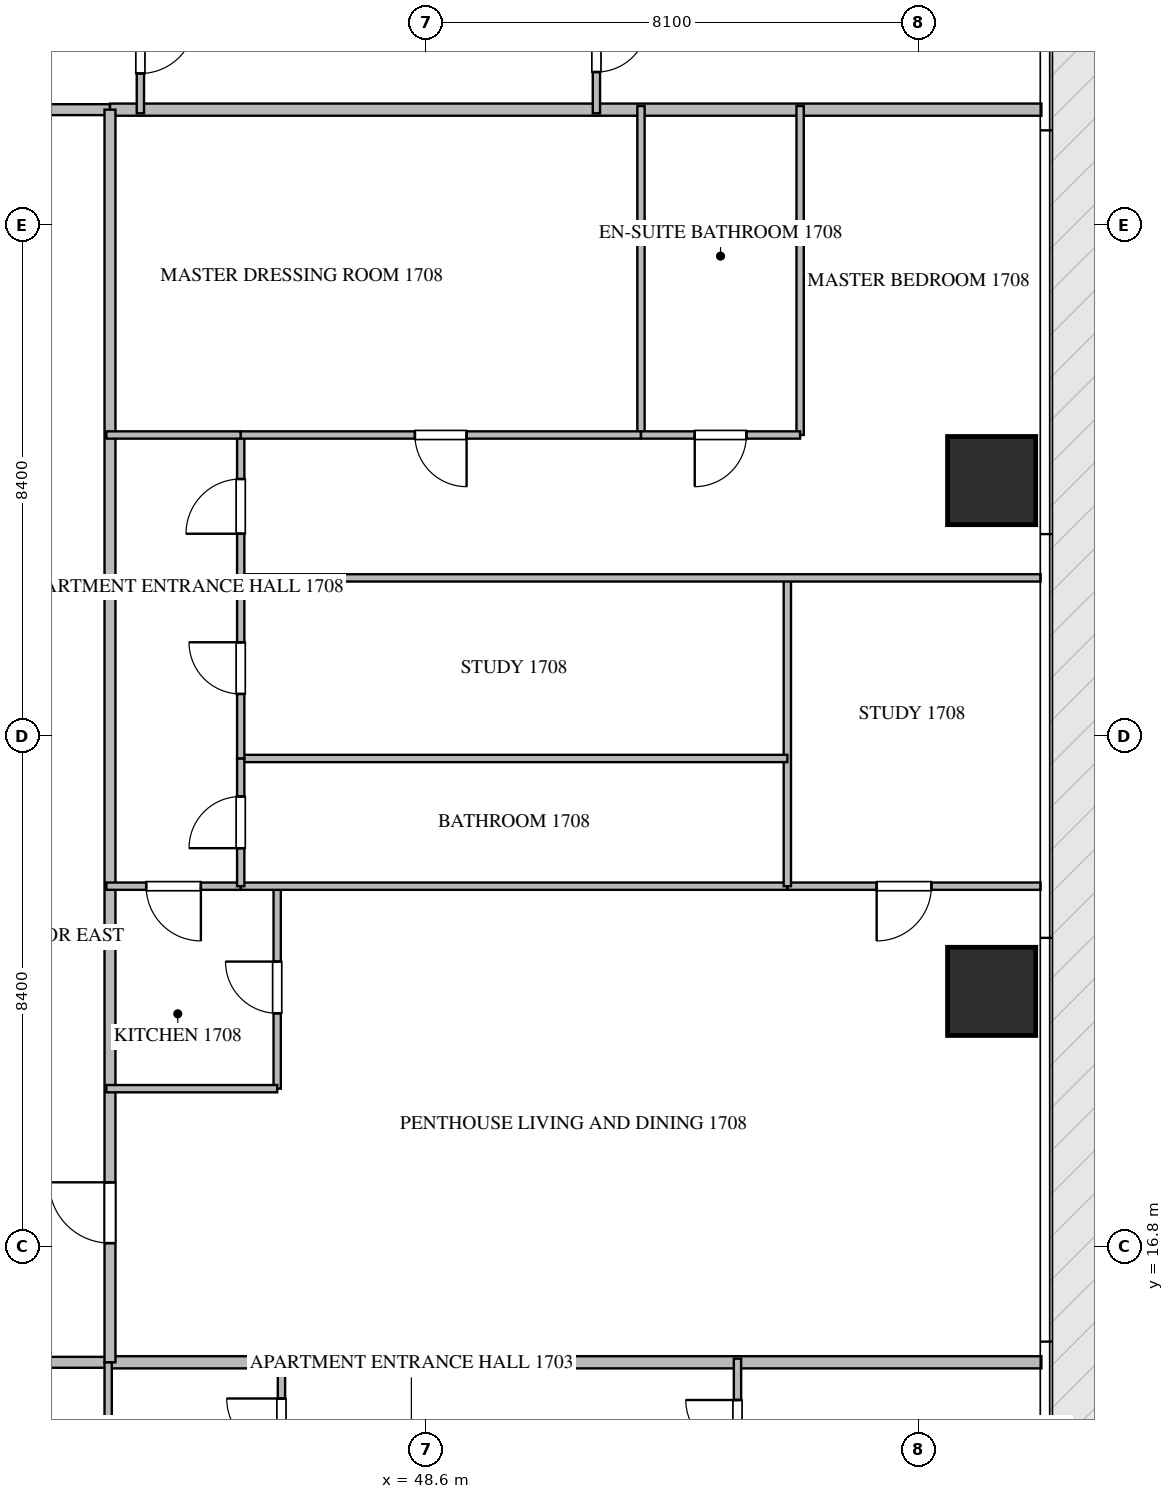
"""IFC4 building model, lengths in metres.
Left out: names, types, materials, properties, quantities, classifications, styles, units other than length and angle.
Written with IfcOpenShell. Run it as: python <this file> out.ifc"""

import sys

from ifc_helpers import new_model, si_unit, direction, frame, frame_2d, origin, origin_2d, place, context, subcontext, project, spatial, rectangle, extrude, source, transform, mapped, element, fill, save


model = new_model("IFC4")
c1 = context("Model", 3, precision=1e-05, world=origin(), true_north=direction((0.0, 1.0)))
c2 = subcontext(c1, "Body", "Model", "MODEL_VIEW")
j1 = project(units=[si_unit("LENGTHUNIT", "METRE"), si_unit("PLANEANGLEUNIT", "RADIAN")], contexts=[c1])
p1 = place(None, origin())
s1 = spatial("IfcSite", under=j1, at=p1, CompositionType="ELEMENT")
p2 = place(p1, origin())
s2 = spatial("IfcBuilding", under=s1, at=p2, CompositionType="ELEMENT")
p3 = place(p2, frame((0.0, 0.0, 71.7)))
s3 = spatial("IfcBuildingStorey", under=s2, at=p3, CompositionType="ELEMENT", Elevation=71.7)
m1 = source(origin(), c2, "Body", "SweptSolid", [
    extrude(rectangle(XDim=1.45, YDim=1.45, at=origin_2d()), origin(), (0.0, 0.0, 1.0), 3.75),
])
for number, where, z_axis, x_axis in (
    (1, (57.9, 21.0, -0.26), (0.0, 0.0, 1.0), (1.0, 0.0, 0.0)),
    (2, (57.9, 29.4, -0.26), (0.0, 0.0, 1.0), (1.0, 0.0, 0.0)),
):
    element("IfcColumn", number, at=place(p3, frame(where, z_axis=z_axis, x_axis=x_axis)), inside=s3, PredefinedType="COLUMN", context=c2, shape_type="MappedRepresentation", body=[
        mapped(m1, transform((0.0, 0.0, 0.0), scale=1.0)),
    ])
for number, where, z_axis, x_axis in (
    (3, (43.4, 14.9, 0.0), (0.0, 0.0, 1.0), (1.0, 0.0, 0.0)),
    (4, (43.4, 35.5, 0.0), (0.0, 0.0, 1.0), (1.0, 0.0, 0.0)),
):
    element("IfcWall", number, at=place(p3, frame(where, z_axis=z_axis, x_axis=x_axis)), inside=s3, PredefinedType="PARTITIONING", context=c2, shape_type="SweptSolid", body=[
        extrude(rectangle(XDim=15.318, YDim=0.2, at=frame_2d((7.659, 0.0))), origin(), (0.0, 0.0, 1.0), 3.49),
    ])
p4 = place(p3, frame((21.402, 14.9, 0.0), z_axis=(0.0, 0.0, 1.0), x_axis=(1.0, 0.0, 0.0)))
e5 = element("IfcWall", 5, at=p4, inside=s3, PredefinedType="PARTITIONING", context=c2, shape_type="SweptSolid", body=[
    extrude(rectangle(XDim=21.996, YDim=0.18, at=frame_2d((10.998, 0.0))), origin(), (0.0, 0.0, 1.0), 3.49),
])
p5 = place(p4, frame((2.1, 0.0, 0.0)))
e6 = element("IfcOpeningElement", 6, at=p5, cuts=e5, PredefinedType="OPENING", context=c2, shape_type="SweptSolid", body=[
    extrude(rectangle(XDim=1.0, YDim=2.15, at=frame_2d((0.5, 1.075))), frame((0.0, 0.1, 0.0), z_axis=(0.0, -1.0, 0.0), x_axis=(1.0, 0.0, 0.0)), (0.0, 0.0, 1.0), 0.2),
])
p6 = place(p4, frame((6.173, 0.0, 0.0)))
e7 = element("IfcOpeningElement", 7, at=p6, cuts=e5, PredefinedType="OPENING", context=c2, shape_type="SweptSolid", body=[
    extrude(rectangle(XDim=1.0, YDim=2.15, at=frame_2d((0.5, 1.075))), frame((0.0, 0.1, 0.0), z_axis=(0.0, -1.0, 0.0), x_axis=(1.0, 0.0, 0.0)), (0.0, 0.0, 1.0), 0.2),
])
p7 = place(p4, frame((18.896, 0.0, 0.0)))
e8 = element("IfcOpeningElement", 8, at=p7, cuts=e5, PredefinedType="OPENING", context=c2, shape_type="SweptSolid", body=[
    extrude(rectangle(XDim=1.0, YDim=2.15, at=frame_2d((0.5, 1.075))), frame((0.0, 0.1, 0.0), z_axis=(0.0, -1.0, 0.0), x_axis=(1.0, 0.0, 0.0)), (0.0, 0.0, 1.0), 0.2),
])
p8 = place(p3, frame((21.402, 35.5, 0.0), z_axis=(0.0, 0.0, 1.0), x_axis=(1.0, 0.0, 0.0)))
e9 = element("IfcWall", 9, at=p8, inside=s3, PredefinedType="PARTITIONING", context=c2, shape_type="SweptSolid", body=[
    extrude(rectangle(XDim=21.996, YDim=0.18, at=frame_2d((10.998, 0.0))), origin(), (0.0, 0.0, 1.0), 3.49),
])
p9 = place(p8, frame((5.774, 0.0, 0.0)))
e10 = element("IfcOpeningElement", 10, at=p9, cuts=e9, PredefinedType="OPENING", context=c2, shape_type="SweptSolid", body=[
    extrude(rectangle(XDim=1.0, YDim=2.15, at=frame_2d((0.5, 1.075))), frame((0.0, 0.1, 0.0), z_axis=(0.0, -1.0, 0.0), x_axis=(1.0, 0.0, 0.0)), (0.0, 0.0, 1.0), 0.2),
])
p10 = place(p8, frame((16.272, 0.0, 0.0)))
e11 = element("IfcOpeningElement", 11, at=p10, cuts=e9, PredefinedType="OPENING", context=c2, shape_type="SweptSolid", body=[
    extrude(rectangle(XDim=1.0, YDim=2.15, at=frame_2d((0.5, 1.075))), frame((0.0, 0.1, 0.0), z_axis=(0.0, -1.0, 0.0), x_axis=(1.0, 0.0, 0.0)), (0.0, 0.0, 1.0), 0.2),
])
p11 = place(p3, frame((43.4, 14.9, 0.0), z_axis=(0.0, 0.0, 1.0), x_axis=(0.0, 1.0, 0.0)))
e12 = element("IfcWall", 12, at=p11, inside=s3, PredefinedType="PARTITIONING", context=c2, shape_type="SweptSolid", body=[
    extrude(rectangle(XDim=20.6, YDim=0.18, at=frame_2d((10.3, 0.0))), origin(), (0.0, 0.0, 1.0), 3.49),
])
p12 = place(p11, frame((1.96, 0.0, 0.0)))
e13 = element("IfcOpeningElement", 13, at=p12, cuts=e12, PredefinedType="OPENING", context=c2, shape_type="SweptSolid", body=[
    extrude(rectangle(XDim=1.0, YDim=2.15, at=frame_2d((0.5, 1.075))), frame((0.0, 0.1, 0.0), z_axis=(0.0, -1.0, 0.0), x_axis=(1.0, 0.0, 0.0)), (0.0, 0.0, 1.0), 0.2),
])
p13 = place(p3, frame((43.37, 12.15, 0.0), z_axis=(0.0, 0.0, 1.0), x_axis=(0.0, 1.0, 0.0)))
e14 = element("IfcWall", 14, at=p13, inside=s3, PredefinedType="PARTITIONING", context=c2, shape_type="SweptSolid", body=[
    extrude(rectangle(XDim=2.748, YDim=0.12, at=frame_2d((1.374, 0.0))), origin(), (0.0, 0.0, 1.0), 3.49),
])
p14 = place(p3, frame((46.22, 12.75, 0.0), z_axis=(0.0, 0.0, 1.0), x_axis=(0.0, 1.0, 0.0)))
e15 = element("IfcWall", 15, at=p14, inside=s3, PredefinedType="PARTITIONING", context=c2, shape_type="SweptSolid", body=[
    extrude(rectangle(XDim=2.21, YDim=0.12, at=frame_2d((1.105, 0.0))), origin(), (0.0, 0.0, 1.0), 3.49),
])
p15 = place(p14, frame((0.655, 0.0, 0.0)))
e16 = element("IfcOpeningElement", 16, at=p15, cuts=e15, PredefinedType="OPENING", context=c2, shape_type="SweptSolid", body=[
    extrude(rectangle(XDim=0.9, YDim=2.1, at=frame_2d((0.45, 1.05))), frame((0.0, 0.07, 0.0), z_axis=(0.0, -1.0, 0.0), x_axis=(1.0, 0.0, 0.0)), (0.0, 0.0, 1.0), 0.14),
])
p16 = place(p3, frame((53.72, 12.75, 0.0), z_axis=(0.0, 0.0, 1.0), x_axis=(0.0, 1.0, 0.0)))
e17 = element("IfcWall", 17, at=p16, inside=s3, PredefinedType="PARTITIONING", context=c2, shape_type="SweptSolid", body=[
    extrude(rectangle(XDim=2.21, YDim=0.12, at=frame_2d((1.105, 0.0))), origin(), (0.0, 0.0, 1.0), 3.49),
])
p17 = place(p16, frame((0.68, 0.0, 0.0)))
e18 = element("IfcOpeningElement", 18, at=p17, cuts=e17, PredefinedType="OPENING", context=c2, shape_type="SweptSolid", body=[
    extrude(rectangle(XDim=0.85, YDim=2.1, at=frame_2d((0.425, 1.05))), frame((0.0, 0.07, 0.0), z_axis=(0.0, -1.0, 0.0), x_axis=(1.0, 0.0, 0.0)), (0.0, 0.0, 1.0), 0.14),
])
p18 = place(p3, frame((43.9, 37.65, 0.0), z_axis=(0.0, 0.0, 1.0), x_axis=(0.0, -1.0, 0.0)))
e19 = element("IfcWall", 19, at=p18, inside=s3, PredefinedType="PARTITIONING", context=c2, shape_type="SweptSolid", body=[
    extrude(rectangle(XDim=2.21, YDim=0.12, at=frame_2d((1.105, 0.0))), origin(), (0.0, 0.0, 1.0), 3.49),
])
p19 = place(p18, frame((0.655, 0.0, 0.0)))
e20 = element("IfcOpeningElement", 20, at=p19, cuts=e19, PredefinedType="OPENING", context=c2, shape_type="SweptSolid", body=[
    extrude(rectangle(XDim=0.9, YDim=2.1, at=frame_2d((0.45, 1.05))), frame((0.0, 0.07, 0.0), z_axis=(0.0, -1.0, 0.0), x_axis=(1.0, 0.0, 0.0)), (0.0, 0.0, 1.0), 0.14),
])
p20 = place(p3, frame((51.4, 37.648, 0.0), z_axis=(0.0, 0.0, 1.0), x_axis=(0.0, -1.0, 0.0)))
e21 = element("IfcWall", 21, at=p20, inside=s3, PredefinedType="PARTITIONING", context=c2, shape_type="SweptSolid", body=[
    extrude(rectangle(XDim=2.208, YDim=0.12, at=frame_2d((1.104, 0.0))), origin(), (0.0, 0.0, 1.0), 3.49),
])
p21 = place(p20, frame((0.679, 0.0, 0.0)))
e22 = element("IfcOpeningElement", 22, at=p21, cuts=e21, PredefinedType="OPENING", context=c2, shape_type="SweptSolid", body=[
    extrude(rectangle(XDim=0.85, YDim=2.1, at=frame_2d((0.425, 1.05))), frame((0.0, 0.07, 0.0), z_axis=(0.0, -1.0, 0.0), x_axis=(1.0, 0.0, 0.0)), (0.0, 0.0, 1.0), 0.14),
])
p22 = place(p3, frame((46.15, 19.4, 0.0), z_axis=(0.0, 0.0, 1.0), x_axis=(0.0, 1.0, 0.0)))
e23 = element("IfcWall", 23, at=p22, inside=s3, PredefinedType="PARTITIONING", context=c2, shape_type="SweptSolid", body=[
    extrude(rectangle(XDim=3.33, YDim=0.12, at=frame_2d((1.665, 0.0))), origin(), (0.0, 0.0, 1.0), 3.49),
])
p23 = place(p22, frame((1.24, 0.0, 0.0)))
e24 = element("IfcOpeningElement", 24, at=p23, cuts=e23, PredefinedType="OPENING", context=c2, shape_type="SweptSolid", body=[
    extrude(rectangle(XDim=0.85, YDim=2.1, at=frame_2d((0.425, 1.05))), frame((0.0, 0.07, 0.0), z_axis=(0.0, -1.0, 0.0), x_axis=(1.0, 0.0, 0.0)), (0.0, 0.0, 1.0), 0.14),
])
p24 = place(p3, frame((46.15, 19.4, 0.0), z_axis=(0.0, 0.0, 1.0), x_axis=(-1.0, 0.0, 0.0)))
e25 = element("IfcWall", 25, at=p24, inside=s3, PredefinedType="PARTITIONING", context=c2, shape_type="SweptSolid", body=[
    extrude(rectangle(XDim=2.81, YDim=0.12, at=frame_2d((1.405, 0.0))), origin(), (0.0, 0.0, 1.0), 3.49),
])
p25 = place(p3, frame((45.55, 22.73, 0.0), z_axis=(0.0, 0.0, 1.0), x_axis=(-1.0, 0.0, 0.0)))
e26 = element("IfcWall", 26, at=p25, inside=s3, PredefinedType="PARTITIONING", context=c2, shape_type="SweptSolid", body=[
    extrude(rectangle(XDim=2.21, YDim=0.12, at=frame_2d((1.105, 0.0))), origin(), (0.0, 0.0, 1.0), 3.49),
])
p26 = place(p25, frame((0.655, 0.0, 0.0)))
e27 = element("IfcOpeningElement", 27, at=p26, cuts=e26, PredefinedType="OPENING", context=c2, shape_type="SweptSolid", body=[
    extrude(rectangle(XDim=0.9, YDim=2.1, at=frame_2d((0.45, 1.05))), frame((0.0, 0.07, 0.0), z_axis=(0.0, -1.0, 0.0), x_axis=(1.0, 0.0, 0.0)), (0.0, 0.0, 1.0), 0.14),
])
p27 = place(p3, frame((58.705, 22.73, 0.0), z_axis=(0.0, 0.0, 1.0), x_axis=(-1.0, 0.0, 0.0)))
e28 = element("IfcWall", 28, at=p27, inside=s3, PredefinedType="PARTITIONING", context=c2, shape_type="SweptSolid", body=[
    extrude(rectangle(XDim=4.165, YDim=0.12, at=frame_2d((2.083, 0.0))), origin(), (0.0, 0.0, 1.0), 3.49),
])
p28 = place(p27, frame((1.796, 0.0, 0.0)))
e29 = element("IfcOpeningElement", 29, at=p28, cuts=e28, PredefinedType="OPENING", context=c2, shape_type="SweptSolid", body=[
    extrude(rectangle(XDim=0.9, YDim=2.1, at=frame_2d((0.45, 1.05))), frame((0.0, 0.07, 0.0), z_axis=(0.0, -1.0, 0.0), x_axis=(1.0, 0.0, 0.0)), (0.0, 0.0, 1.0), 0.14),
])
p29 = place(p3, frame((54.538, 22.73, 0.0), z_axis=(0.0, 0.0, 1.0), x_axis=(-1.0, 0.0, 0.0)))
e30 = element("IfcWall", 30, at=p29, inside=s3, PredefinedType="PARTITIONING", context=c2, shape_type="SweptSolid", body=[
    extrude(rectangle(XDim=8.986, YDim=0.12, at=frame_2d((4.493, 0.0))), origin(), (0.0, 0.0, 1.0), 3.49),
])
p30 = place(p3, frame((54.54, 22.73, 0.0), z_axis=(0.0, 0.0, 1.0), x_axis=(0.0, 1.0, 0.0)))
e31 = element("IfcWall", 31, at=p30, inside=s3, PredefinedType="PARTITIONING", context=c2, shape_type="SweptSolid", body=[
    extrude(rectangle(XDim=5.07, YDim=0.12, at=frame_2d((2.535, 0.0))), origin(), (0.0, 0.0, 1.0), 3.49),
])
p31 = place(p3, frame((58.705, 27.8, 0.0), z_axis=(0.0, 0.0, 1.0), x_axis=(-1.0, 0.0, 0.0)))
e32 = element("IfcWall", 32, at=p31, inside=s3, PredefinedType="PARTITIONING", context=c2, shape_type="SweptSolid", body=[
    extrude(rectangle(XDim=13.155, YDim=0.12, at=frame_2d((6.578, 0.0))), origin(), (0.0, 0.0, 1.0), 3.49),
])
p32 = place(p3, frame((54.54, 24.83, 0.0), z_axis=(0.0, 0.0, 1.0), x_axis=(-1.0, 0.0, 0.0)))
e33 = element("IfcWall", 33, at=p32, inside=s3, PredefinedType="PARTITIONING", context=c2, shape_type="SweptSolid", body=[
    extrude(rectangle(XDim=8.99, YDim=0.12, at=frame_2d((4.495, 0.0))), origin(), (0.0, 0.0, 1.0), 3.49),
])
p33 = place(p3, frame((45.55, 22.73, 0.0), z_axis=(0.0, 0.0, 1.0), x_axis=(0.0, 1.0, 0.0)))
e34 = element("IfcWall", 34, at=p33, inside=s3, PredefinedType="PARTITIONING", context=c2, shape_type="SweptSolid", body=[
    extrude(rectangle(XDim=2.1, YDim=0.12, at=frame_2d((1.05, 0.0))), origin(), (0.0, 0.0, 1.0), 3.49),
])
p34 = place(p33, frame((0.625, 0.0, 0.0)))
e35 = element("IfcOpeningElement", 35, at=p34, cuts=e34, PredefinedType="OPENING", context=c2, shape_type="SweptSolid", body=[
    extrude(rectangle(XDim=0.85, YDim=2.1, at=frame_2d((0.425, 1.05))), frame((0.0, 0.07, 0.0), z_axis=(0.0, -1.0, 0.0), x_axis=(1.0, 0.0, 0.0)), (0.0, 0.0, 1.0), 0.14),
])
p35 = place(p3, frame((45.55, 24.832, 0.0), z_axis=(0.0, 0.0, 1.0), x_axis=(0.0, 1.0, 0.0)))
e36 = element("IfcWall", 36, at=p35, inside=s3, PredefinedType="PARTITIONING", context=c2, shape_type="SweptSolid", body=[
    extrude(rectangle(XDim=2.968, YDim=0.12, at=frame_2d((1.484, 0.0))), origin(), (0.0, 0.0, 1.0), 3.49),
])
p36 = place(p35, frame((1.059, 0.0, 0.0)))
e37 = element("IfcOpeningElement", 37, at=p36, cuts=e36, PredefinedType="OPENING", context=c2, shape_type="SweptSolid", body=[
    extrude(rectangle(XDim=0.85, YDim=2.1, at=frame_2d((0.425, 1.05))), frame((0.0, 0.07, 0.0), z_axis=(0.0, -1.0, 0.0), x_axis=(1.0, 0.0, 0.0)), (0.0, 0.0, 1.0), 0.14),
])
p37 = place(p3, frame((45.55, 27.802, 0.0), z_axis=(0.0, 0.0, 1.0), x_axis=(0.0, 1.0, 0.0)))
e38 = element("IfcWall", 38, at=p37, inside=s3, PredefinedType="PARTITIONING", context=c2, shape_type="SweptSolid", body=[
    extrude(rectangle(XDim=2.348, YDim=0.12, at=frame_2d((1.174, 0.0))), origin(), (0.0, 0.0, 1.0), 3.49),
])
p38 = place(p37, frame((0.724, 0.0, 0.0)))
e39 = element("IfcOpeningElement", 39, at=p38, cuts=e38, PredefinedType="OPENING", context=c2, shape_type="SweptSolid", body=[
    extrude(rectangle(XDim=0.9, YDim=2.1, at=frame_2d((0.45, 1.05))), frame((0.0, 0.07, 0.0), z_axis=(0.0, -1.0, 0.0), x_axis=(1.0, 0.0, 0.0)), (0.0, 0.0, 1.0), 0.14),
])
for number, where, z_axis, x_axis in (
    (40, (54.75, 30.15, 0.0), (0.0, 0.0, 1.0), (0.0, 1.0, 0.0)),
    (41, (52.133, 30.15, 0.0), (0.0, 0.0, 1.0), (0.0, 1.0, 0.0)),
):
    element("IfcWall", number, at=place(p3, frame(where, z_axis=z_axis, x_axis=x_axis)), inside=s3, PredefinedType="PARTITIONING", context=c2, shape_type="SweptSolid", body=[
        extrude(rectangle(XDim=5.41, YDim=0.12, at=frame_2d((2.705, 0.0))), origin(), (0.0, 0.0, 1.0), 3.49),
    ])
p39 = place(p3, frame((54.75, 30.15, 0.0), z_axis=(0.0, 0.0, 1.0), x_axis=(-1.0, 0.0, 0.0)))
e42 = element("IfcWall", 42, at=p39, inside=s3, PredefinedType="PARTITIONING", context=c2, shape_type="SweptSolid", body=[
    extrude(rectangle(XDim=2.617, YDim=0.12, at=frame_2d((1.309, 0.0))), origin(), (0.0, 0.0, 1.0), 3.49),
])
p40 = place(p39, frame((0.883, 0.0, 0.0)))
e43 = element("IfcOpeningElement", 43, at=p40, cuts=e42, PredefinedType="OPENING", context=c2, shape_type="SweptSolid", body=[
    extrude(rectangle(XDim=0.85, YDim=2.1, at=frame_2d((0.425, 1.05))), frame((0.0, 0.07, 0.0), z_axis=(0.0, -1.0, 0.0), x_axis=(1.0, 0.0, 0.0)), (0.0, 0.0, 1.0), 0.14),
])
p41 = place(p3, frame((52.131, 30.15, 0.0), z_axis=(0.0, 0.0, 1.0), x_axis=(-1.0, 0.0, 0.0)))
e44 = element("IfcWall", 44, at=p41, inside=s3, PredefinedType="PARTITIONING", context=c2, shape_type="SweptSolid", body=[
    extrude(rectangle(XDim=6.581, YDim=0.12, at=frame_2d((3.291, 0.0))), origin(), (0.0, 0.0, 1.0), 3.49),
])
p42 = place(p41, frame((2.866, 0.0, 0.0)))
e45 = element("IfcOpeningElement", 45, at=p42, cuts=e44, PredefinedType="OPENING", context=c2, shape_type="SweptSolid", body=[
    extrude(rectangle(XDim=0.85, YDim=2.1, at=frame_2d((0.425, 1.05))), frame((0.0, 0.07, 0.0), z_axis=(0.0, -1.0, 0.0), x_axis=(1.0, 0.0, 0.0)), (0.0, 0.0, 1.0), 0.14),
])
p43 = place(p3, frame((45.548, 30.15, 0.0), z_axis=(0.0, 0.0, 1.0), x_axis=(-1.0, 0.0, 0.0)))
e46 = element("IfcWall", 46, at=p43, inside=s3, PredefinedType="PARTITIONING", context=c2, shape_type="SweptSolid", body=[
    extrude(rectangle(XDim=2.208, YDim=0.12, at=frame_2d((1.104, 0.0))), origin(), (0.0, 0.0, 1.0), 3.49),
])
m2 = source(origin(), c2, "Body", "SweptSolid", [
    extrude(rectangle(XDim=1.0, YDim=2.15, at=frame_2d((0.5, 1.075))), frame((0.0, 0.025, 0.0), z_axis=(0.0, -1.0, 0.0), x_axis=(1.0, 0.0, 0.0)), (0.0, 0.0, 1.0), 0.05),
])
p44 = place(p12, origin())
e47 = element("IfcDoor", 47, at=p44, inside=s3, OperationType="SINGLE_SWING_RIGHT", PredefinedType="DOOR", context=c2, shape_type="MappedRepresentation", body=[
    mapped(m2, transform((0.0, 0.0, 0.0), scale=1.0)),
])
fill(e13, e47)
m3 = source(origin(), c2, "Body", "SweptSolid", [
    extrude(rectangle(XDim=0.9, YDim=2.1, at=frame_2d((0.45, 1.05))), frame((0.0, 0.025, 0.0), z_axis=(0.0, -1.0, 0.0), x_axis=(1.0, 0.0, 0.0)), (0.0, 0.0, 1.0), 0.05),
])
p45 = place(p15, origin())
e48 = element("IfcDoor", 48, at=p45, inside=s3, OperationType="SINGLE_SWING_RIGHT", PredefinedType="DOOR", context=c2, shape_type="MappedRepresentation", body=[
    mapped(m3, transform((0.0, 0.0, 0.0), scale=1.0)),
])
fill(e16, e48)
m4 = source(origin(), c2, "Body", "SweptSolid", [
    extrude(rectangle(XDim=0.85, YDim=2.1, at=frame_2d((0.425, 1.05))), frame((0.0, 0.025, 0.0), z_axis=(0.0, -1.0, 0.0), x_axis=(1.0, 0.0, 0.0)), (0.0, 0.0, 1.0), 0.05),
])
p46 = place(p17, origin())
e49 = element("IfcDoor", 49, at=p46, inside=s3, OperationType="SINGLE_SWING_RIGHT", PredefinedType="DOOR", context=c2, shape_type="MappedRepresentation", body=[
    mapped(m4, transform((0.0, 0.0, 0.0), scale=1.0)),
])
fill(e18, e49)
p47 = place(p19, origin())
e50 = element("IfcDoor", 50, at=p47, inside=s3, OperationType="SINGLE_SWING_LEFT", PredefinedType="DOOR", context=c2, shape_type="MappedRepresentation", body=[
    mapped(m3, transform((0.0, 0.0, 0.0), scale=1.0)),
])
fill(e20, e50)
p48 = place(p21, origin())
e51 = element("IfcDoor", 51, at=p48, inside=s3, OperationType="SINGLE_SWING_LEFT", PredefinedType="DOOR", context=c2, shape_type="MappedRepresentation", body=[
    mapped(m4, transform((0.0, 0.0, 0.0), scale=1.0)),
])
fill(e22, e51)
p49 = place(p23, origin())
e52 = element("IfcDoor", 52, at=p49, inside=s3, OperationType="SINGLE_SWING_RIGHT", PredefinedType="DOOR", context=c2, shape_type="MappedRepresentation", body=[
    mapped(m4, transform((0.0, 0.0, 0.0), scale=1.0)),
])
fill(e24, e52)
p50 = place(p26, origin())
e53 = element("IfcDoor", 53, at=p50, inside=s3, OperationType="SINGLE_SWING_LEFT", PredefinedType="DOOR", context=c2, shape_type="MappedRepresentation", body=[
    mapped(m3, transform((0.0, 0.0, 0.0), scale=1.0)),
])
fill(e27, e53)
p51 = place(p28, origin())
e54 = element("IfcDoor", 54, at=p51, inside=s3, OperationType="SINGLE_SWING_RIGHT", PredefinedType="DOOR", context=c2, shape_type="MappedRepresentation", body=[
    mapped(m3, transform((0.0, 0.0, 0.0), scale=1.0)),
])
fill(e29, e54)
p52 = place(p34, origin())
e55 = element("IfcDoor", 55, at=p52, inside=s3, OperationType="SINGLE_SWING_LEFT", PredefinedType="DOOR", context=c2, shape_type="MappedRepresentation", body=[
    mapped(m4, transform((0.0, 0.0, 0.0), scale=1.0)),
])
fill(e35, e55)
p53 = place(p36, origin())
e56 = element("IfcDoor", 56, at=p53, inside=s3, OperationType="SINGLE_SWING_RIGHT", PredefinedType="DOOR", context=c2, shape_type="MappedRepresentation", body=[
    mapped(m4, transform((0.0, 0.0, 0.0), scale=1.0)),
])
fill(e37, e56)
p54 = place(p38, origin())
e57 = element("IfcDoor", 57, at=p54, inside=s3, OperationType="SINGLE_SWING_LEFT", PredefinedType="DOOR", context=c2, shape_type="MappedRepresentation", body=[
    mapped(m3, transform((0.0, 0.0, 0.0), scale=1.0)),
])
fill(e39, e57)
p55 = place(p40, origin())
e58 = element("IfcDoor", 58, at=p55, inside=s3, OperationType="SINGLE_SWING_RIGHT", PredefinedType="DOOR", context=c2, shape_type="MappedRepresentation", body=[
    mapped(m4, transform((0.0, 0.0, 0.0), scale=1.0)),
])
fill(e43, e58)
p56 = place(p42, origin())
e59 = element("IfcDoor", 59, at=p56, inside=s3, OperationType="SINGLE_SWING_LEFT", PredefinedType="DOOR", context=c2, shape_type="MappedRepresentation", body=[
    mapped(m4, transform((0.0, 0.0, 0.0), scale=1.0)),
])
fill(e45, e59)
save(model, sys.argv[1])
